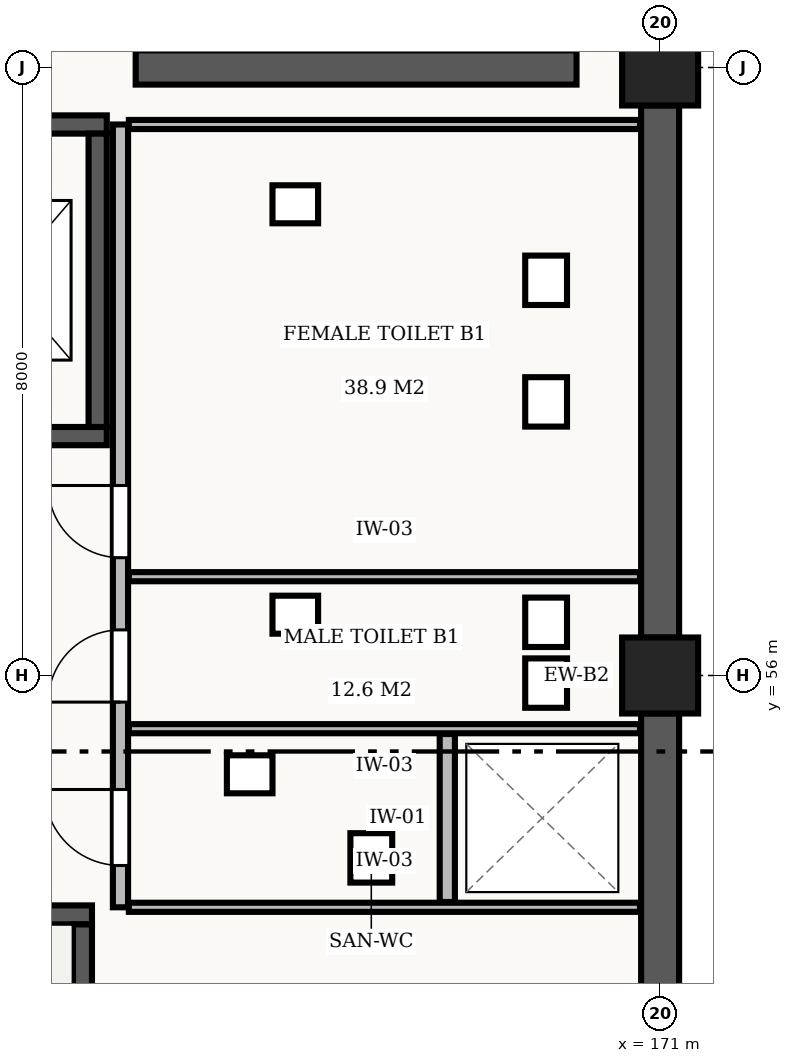
"""IFC4 building model, lengths in metres.
Left out: names, types, materials, properties, quantities, classifications, styles, units other than length and angle.
Written with IfcOpenShell. Run it as: python <this file> out.ifc"""

import sys

from ifc_helpers import new_model, si_unit, direction, frame, frame_2d, origin, origin_2d, place, context, subcontext, project, spatial, rectangle, extrude, element, fill, save


model = new_model("IFC4")
c1 = context("Model", 3, precision=1e-05, world=origin(), true_north=direction((0.0, 1.0)))
c2 = subcontext(c1, "Body", "Model", "MODEL_VIEW")
j1 = project(units=[si_unit("LENGTHUNIT", "METRE"), si_unit("PLANEANGLEUNIT", "RADIAN")], contexts=[c1])
p1 = place(None, origin())
s1 = spatial("IfcSite", under=j1, at=p1, CompositionType="ELEMENT")
p2 = place(p1, origin())
s2 = spatial("IfcBuilding", under=s1, at=p2, CompositionType="ELEMENT")
p3 = place(p2, frame((0.0, 0.0, -6.0)))
s3 = spatial("IfcBuildingStorey", under=s2, at=p3, CompositionType="ELEMENT", Elevation=-6.0)
for number, where, z_axis, x_axis in (
    (1, (171.0, 56.0, 0.0), (0.0, 0.0, 1.0), (1.0, 0.0, 0.0)),
    (2, (171.0, 64.0, 0.0), (0.0, 0.0, 1.0), (1.0, 0.0, 0.0)),
):
    element("IfcColumn", number, at=place(p3, frame(where, z_axis=z_axis, x_axis=x_axis)), inside=s3, PredefinedType="COLUMN", context=c2, shape_type="SweptSolid", body=[
        extrude(rectangle(XDim=1.0, YDim=1.0, at=origin_2d()), origin(), (0.0, 0.0, 1.0), 6.0),
    ])
for number, where, z_axis, x_axis in (
    (3, (171.0, 63.502, 0.0), (0.0, 0.0, 1.0), (0.0, -1.0, 0.0)),
    (4, (171.0, 55.502, 0.0), (0.0, 0.0, 1.0), (0.0, -1.0, 0.0)),
):
    element("IfcWall", number, at=place(p3, frame(where, z_axis=z_axis, x_axis=x_axis)), inside=s3, PredefinedType="STANDARD", context=c2, shape_type="SweptSolid", body=[
        extrude(rectangle(XDim=7.004, YDim=0.5, at=frame_2d((3.502, 0.0))), origin(), (0.0, 0.0, 1.0), 5.56),
    ])
p4 = place(p3, frame((163.525, 52.85, 0.0), z_axis=(0.0, 0.0, 1.0), x_axis=(-1.0, 0.0, 0.0)))
e5 = element("IfcWall", 5, at=p4, inside=s3, PredefinedType="SHEAR", context=c2, shape_type="SweptSolid", body=[
    extrude(rectangle(XDim=9.65, YDim=0.25, at=frame_2d((4.825, 0.0))), origin(), (0.0, 0.0, 1.0), 5.55),
])
p5 = place(p4, frame((7.925, 0.0, 0.0)))
e6 = element("IfcOpeningElement", 6, at=p5, cuts=e5, PredefinedType="OPENING", context=c2, shape_type="SweptSolid", body=[
    extrude(rectangle(XDim=1.25, YDim=2.15, at=frame_2d((0.625, 1.075))), frame((0.0, 0.137, 0.0), z_axis=(0.0, -1.0, 0.0), x_axis=(1.0, 0.0, 0.0)), (0.0, 0.0, 1.0), 0.274),
])
p6 = place(p3, frame((163.4, 48.875, 0.0), z_axis=(0.0, 0.0, 1.0), x_axis=(0.0, 1.0, 0.0)))
e7 = element("IfcWall", 7, at=p6, inside=s3, PredefinedType="SHEAR", context=c2, shape_type="SweptSolid", body=[
    extrude(rectangle(XDim=3.85, YDim=0.25, at=frame_2d((1.925, 0.0))), origin(), (0.0, 0.0, 1.0), 5.55),
])
p7 = place(p3, frame((160.975, 59.15, 0.0), z_axis=(0.0, 0.0, 1.0), x_axis=(1.0, 0.0, 0.0)))
e8 = element("IfcWall", 8, at=p7, inside=s3, PredefinedType="SHEAR", context=c2, shape_type="SweptSolid", body=[
    extrude(rectangle(XDim=2.745, YDim=0.24, at=frame_2d((1.373, 0.0))), origin(), (0.0, 0.0, 1.0), 5.55),
])
p8 = place(p7, frame((0.825, 0.0, 0.0)))
e9 = element("IfcOpeningElement", 9, at=p8, cuts=e8, PredefinedType="OPENING", context=c2, shape_type="SweptSolid", body=[
    extrude(rectangle(XDim=1.1, YDim=2.2, at=frame_2d((0.55, 1.1))), frame((0.0, 0.132, 0.0), z_axis=(0.0, -1.0, 0.0), x_axis=(1.0, 0.0, 0.0)), (0.0, 0.0, 1.0), 0.264),
])
p9 = place(p3, frame((163.72, 63.25, 0.0), z_axis=(0.0, 0.0, 1.0), x_axis=(-1.0, 0.0, 0.0)))
e10 = element("IfcWall", 10, at=p9, inside=s3, PredefinedType="SHEAR", context=c2, shape_type="SweptSolid", body=[
    extrude(rectangle(XDim=2.745, YDim=0.24, at=frame_2d((1.373, 0.0))), origin(), (0.0, 0.0, 1.0), 5.55),
])
p10 = place(p3, frame((163.6, 59.27, 0.0), z_axis=(0.0, 0.0, 1.0), x_axis=(0.0, 1.0, 0.0)))
e11 = element("IfcWall", 11, at=p10, inside=s3, PredefinedType="SHEAR", context=c2, shape_type="SweptSolid", body=[
    extrude(rectangle(XDim=3.86, YDim=0.24, at=frame_2d((1.93, 0.0))), origin(), (0.0, 0.0, 1.0), 5.55),
])
p11 = place(p3, frame((164.1, 64.0, 0.0), z_axis=(0.0, 0.0, 1.0), x_axis=(1.0, 0.0, 0.0)))
e12 = element("IfcWall", 12, at=p11, inside=s3, PredefinedType="SHEAR", context=c2, shape_type="SweptSolid", body=[
    extrude(rectangle(XDim=5.8, YDim=0.45, at=frame_2d((2.9, 0.0))), origin(), (0.0, 0.0, 1.0), 4.6),
])
p12 = place(p3, frame((163.9, 52.95, 0.0), z_axis=(0.0, 0.0, 1.0), x_axis=(0.0, 1.0, 0.0)))
e13 = element("IfcWall", 13, at=p12, inside=s3, PredefinedType="STANDARD", context=c2, shape_type="SweptSolid", body=[
    extrude(rectangle(XDim=10.3, YDim=0.2, at=frame_2d((5.15, 0.0))), origin(), (0.0, 0.0, 1.0), 5.55),
])
p13 = place(p12, frame((0.55, 0.0, 0.0)))
e14 = element("IfcOpeningElement", 14, at=p13, cuts=e13, PredefinedType="OPENING", context=c2, shape_type="SweptSolid", body=[
    extrude(rectangle(XDim=1.0, YDim=2.1, at=frame_2d((0.5, 1.05))), frame((0.0, 0.112, 0.0), z_axis=(0.0, -1.0, 0.0), x_axis=(1.0, 0.0, 0.0)), (0.0, 0.0, 1.0), 0.224),
])
p14 = place(p12, frame((2.7, 0.0, 0.0)))
e15 = element("IfcOpeningElement", 15, at=p14, cuts=e13, PredefinedType="OPENING", context=c2, shape_type="SweptSolid", body=[
    extrude(rectangle(XDim=0.95, YDim=2.1, at=frame_2d((0.475, 1.05))), frame((0.0, 0.112, 0.0), z_axis=(0.0, -1.0, 0.0), x_axis=(1.0, 0.0, 0.0)), (0.0, 0.0, 1.0), 0.224),
])
p15 = place(p12, frame((4.6, 0.0, 0.0)))
e16 = element("IfcOpeningElement", 16, at=p15, cuts=e13, PredefinedType="OPENING", context=c2, shape_type="SweptSolid", body=[
    extrude(rectangle(XDim=0.95, YDim=2.1, at=frame_2d((0.475, 1.05))), frame((0.0, 0.112, 0.0), z_axis=(0.0, -1.0, 0.0), x_axis=(1.0, 0.0, 0.0)), (0.0, 0.0, 1.0), 0.224),
])
p16 = place(p3, frame((168.2, 53.02, 0.0), z_axis=(0.0, 0.0, 1.0), x_axis=(0.0, 1.0, 0.0)))
e17 = element("IfcWall", 17, at=p16, inside=s3, PredefinedType="STANDARD", context=c2, shape_type="SweptSolid", body=[
    extrude(rectangle(XDim=2.21, YDim=0.2, at=frame_2d((1.105, 0.0))), origin(), (0.0, 0.0, 1.0), 5.55),
])
for number, where, z_axis, x_axis in (
    (18, (164.01, 52.95, 0.0), (0.0, 0.0, 1.0), (1.0, 0.0, 0.0)),
    (19, (164.01, 55.3, 0.0), (0.0, 0.0, 1.0), (1.0, 0.0, 0.0)),
    (20, (164.01, 57.3, 0.0), (0.0, 0.0, 1.0), (1.0, 0.0, 0.0)),
    (21, (164.01, 63.25, 0.0), (0.0, 0.0, 1.0), (1.0, 0.0, 0.0)),
):
    element("IfcWall", number, at=place(p3, frame(where, z_axis=z_axis, x_axis=x_axis)), inside=s3, PredefinedType="STANDARD", context=c2, shape_type="SweptSolid", body=[
        extrude(rectangle(XDim=6.725, YDim=0.12, at=frame_2d((3.363, 0.0))), origin(), (0.0, 0.0, 1.0), 5.55),
    ])
p17 = place(p13, origin())
e22 = element("IfcDoor", 22, at=p17, inside=s3, OperationType="SINGLE_SWING_RIGHT", PredefinedType="DOOR", context=c2, shape_type="SweptSolid", body=[
    extrude(rectangle(XDim=1.0, YDim=2.1, at=frame_2d((0.5, 1.05))), frame((0.0, 0.025, 0.0), z_axis=(0.0, -1.0, 0.0), x_axis=(1.0, 0.0, 0.0)), (0.0, 0.0, 1.0), 0.05),
])
fill(e14, e22)
p18 = place(p14, origin())
e23 = element("IfcDoor", 23, at=p18, inside=s3, OperationType="SINGLE_SWING_LEFT", PredefinedType="DOOR", context=c2, shape_type="SweptSolid", body=[
    extrude(rectangle(XDim=0.95, YDim=2.1, at=frame_2d((0.475, 1.05))), frame((0.0, 0.025, 0.0), z_axis=(0.0, -1.0, 0.0), x_axis=(1.0, 0.0, 0.0)), (0.0, 0.0, 1.0), 0.05),
])
fill(e15, e23)
p19 = place(p15, origin())
e24 = element("IfcDoor", 24, at=p19, inside=s3, OperationType="SINGLE_SWING_RIGHT", PredefinedType="DOOR", context=c2, shape_type="SweptSolid", body=[
    extrude(rectangle(XDim=0.95, YDim=2.1, at=frame_2d((0.475, 1.05))), frame((0.0, 0.025, 0.0), z_axis=(0.0, -1.0, 0.0), x_axis=(1.0, 0.0, 0.0)), (0.0, 0.0, 1.0), 0.05),
])
fill(e16, e24)
save(model, sys.argv[1])
